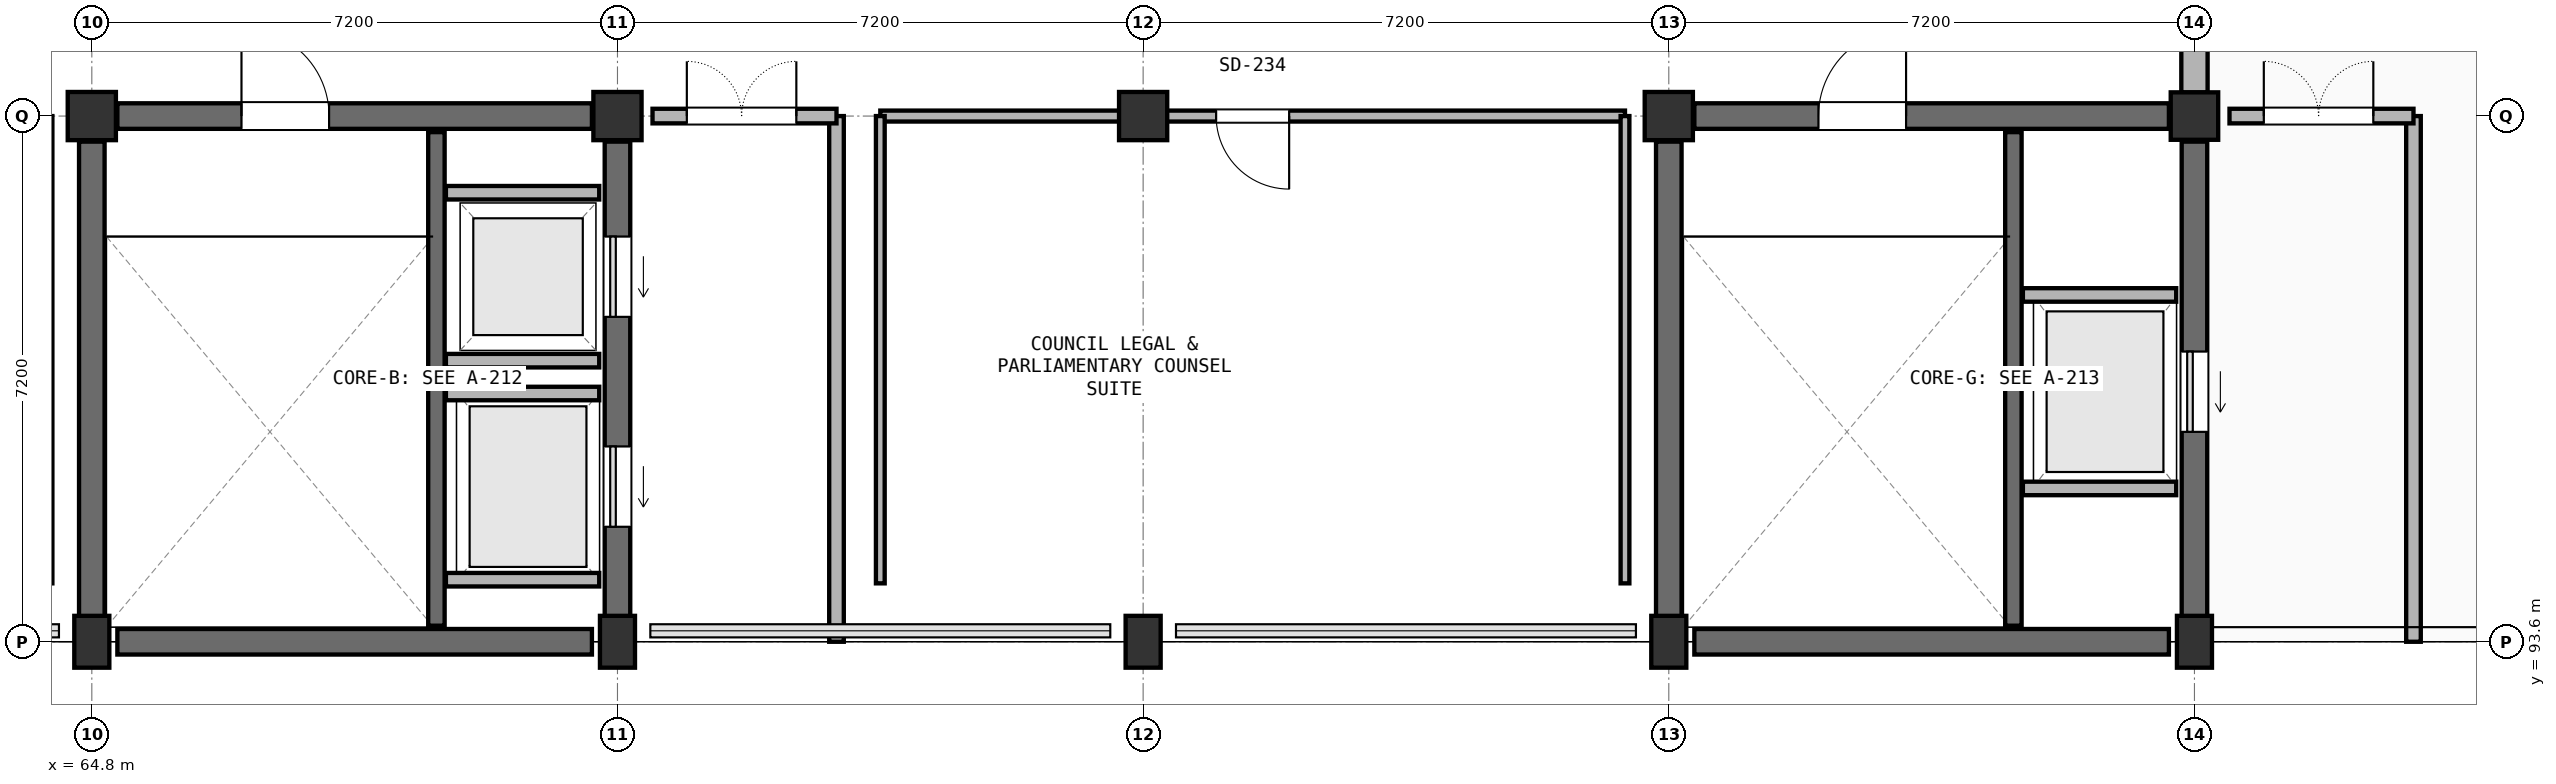
"""IFC4 building model, lengths in metres.
Left out: names, types, materials, properties, quantities, classifications, styles, units other than length and angle.
Written with IfcOpenShell. Run it as: python <this file> out.ifc"""

import sys

from ifc_helpers import new_model, si_unit, direction, frame, frame_2d, origin, origin_2d, place, context, subcontext, project, spatial, rectangle, extrude, element, fill, save


model = new_model("IFC4")
c1 = context("Model", 3, precision=1e-05, world=origin(), true_north=direction((0.0, 1.0)))
c2 = subcontext(c1, "Body", "Model", "MODEL_VIEW")
j1 = project(units=[si_unit("LENGTHUNIT", "METRE"), si_unit("PLANEANGLEUNIT", "RADIAN")], contexts=[c1])
p1 = place(None, origin())
s1 = spatial("IfcSite", under=j1, at=p1, CompositionType="ELEMENT")
p2 = place(p1, origin())
s2 = spatial("IfcBuilding", under=s1, at=p2, CompositionType="ELEMENT")
p3 = place(p2, frame((0.0, 0.0, 30.3)))
s3 = spatial("IfcBuildingStorey", under=s2, at=p3, CompositionType="ELEMENT", Elevation=30.3)
p4 = place(p3, frame((64.8, 93.6, 0.0), z_axis=(0.0, 0.0, 1.0), x_axis=(1.0, 0.0, 0.0)))
e1 = element("IfcColumn", 1, at=p4, inside=s3, PredefinedType="COLUMN", context=c2, shape_type="SweptSolid", body=[
    extrude(rectangle(XDim=0.48, YDim=0.71, at=origin_2d()), origin(), (0.0, 0.0, 1.0), 3.9),
])
p5 = place(p3, frame((64.8, 100.8, 0.0), z_axis=(0.0, 0.0, 1.0), x_axis=(1.0, 0.0, 0.0)))
e2 = element("IfcColumn", 2, at=p5, inside=s3, PredefinedType="COLUMN", context=c2, shape_type="SweptSolid", body=[
    extrude(rectangle(XDim=0.66, YDim=0.66, at=origin_2d()), origin(), (0.0, 0.0, 1.0), 3.9),
])
p6 = place(p3, frame((72.0, 93.6, 0.0), z_axis=(0.0, 0.0, 1.0), x_axis=(1.0, 0.0, 0.0)))
e3 = element("IfcColumn", 3, at=p6, inside=s3, PredefinedType="COLUMN", context=c2, shape_type="SweptSolid", body=[
    extrude(rectangle(XDim=0.48, YDim=0.71, at=origin_2d()), origin(), (0.0, 0.0, 1.0), 3.9),
])
p7 = place(p3, frame((72.0, 100.8, 0.0), z_axis=(0.0, 0.0, 1.0), x_axis=(1.0, 0.0, 0.0)))
e4 = element("IfcColumn", 4, at=p7, inside=s3, PredefinedType="COLUMN", context=c2, shape_type="SweptSolid", body=[
    extrude(rectangle(XDim=0.66, YDim=0.66, at=origin_2d()), origin(), (0.0, 0.0, 1.0), 3.9),
])
p8 = place(p3, frame((79.2, 93.6, 0.0), z_axis=(0.0, 0.0, 1.0), x_axis=(1.0, 0.0, 0.0)))
e5 = element("IfcColumn", 5, at=p8, inside=s3, PredefinedType="COLUMN", context=c2, shape_type="SweptSolid", body=[
    extrude(rectangle(XDim=0.48, YDim=0.71, at=origin_2d()), origin(), (0.0, 0.0, 1.0), 3.9),
])
p9 = place(p3, frame((79.2, 100.8, 0.0), z_axis=(0.0, 0.0, 1.0), x_axis=(1.0, 0.0, 0.0)))
e6 = element("IfcColumn", 6, at=p9, inside=s3, PredefinedType="COLUMN", context=c2, shape_type="SweptSolid", body=[
    extrude(rectangle(XDim=0.66, YDim=0.66, at=origin_2d()), origin(), (0.0, 0.0, 1.0), 3.9),
])
p10 = place(p3, frame((86.4, 93.6, 0.0), z_axis=(0.0, 0.0, 1.0), x_axis=(1.0, 0.0, 0.0)))
e7 = element("IfcColumn", 7, at=p10, inside=s3, PredefinedType="COLUMN", context=c2, shape_type="SweptSolid", body=[
    extrude(rectangle(XDim=0.48, YDim=0.71, at=origin_2d()), origin(), (0.0, 0.0, 1.0), 3.9),
])
p11 = place(p3, frame((86.4, 100.8, 0.0), z_axis=(0.0, 0.0, 1.0), x_axis=(1.0, 0.0, 0.0)))
e8 = element("IfcColumn", 8, at=p11, inside=s3, PredefinedType="COLUMN", context=c2, shape_type="SweptSolid", body=[
    extrude(rectangle(XDim=0.66, YDim=0.66, at=origin_2d()), origin(), (0.0, 0.0, 1.0), 3.9),
])
p12 = place(p3, frame((93.6, 93.6, 0.0), z_axis=(0.0, 0.0, 1.0), x_axis=(1.0, 0.0, 0.0)))
e9 = element("IfcColumn", 9, at=p12, inside=s3, PredefinedType="COLUMN", context=c2, shape_type="SweptSolid", body=[
    extrude(rectangle(XDim=0.48, YDim=0.71, at=origin_2d()), origin(), (0.0, 0.0, 1.0), 3.9),
])
p13 = place(p3, frame((93.6, 100.8, 0.0), z_axis=(0.0, 0.0, 1.0), x_axis=(1.0, 0.0, 0.0)))
e10 = element("IfcColumn", 10, at=p13, inside=s3, PredefinedType="COLUMN", context=c2, shape_type="SweptSolid", body=[
    extrude(rectangle(XDim=0.65, YDim=0.65, at=origin_2d()), origin(), (0.0, 0.0, 1.0), 3.9),
])
p14 = place(p3, frame((65.15, 93.6, 0.0), z_axis=(0.0, 0.0, 1.0), x_axis=(1.0, 0.0, 0.0)))
e11 = element("IfcWall", 11, at=p14, inside=s3, PredefinedType="SHEAR", context=c2, shape_type="SweptSolid", body=[
    extrude(rectangle(XDim=6.5, YDim=0.35, at=frame_2d((3.25, 0.0))), origin(), (0.0, 0.0, 1.0), 3.9),
])
p15 = place(p3, frame((72.0, 93.95, 0.0), z_axis=(0.0, 0.0, 1.0), x_axis=(0.0, 1.0, 0.0)))
e12 = element("IfcWall", 12, at=p15, inside=s3, PredefinedType="SHEAR", context=c2, shape_type="SweptSolid", body=[
    extrude(rectangle(XDim=6.5, YDim=0.35, at=frame_2d((3.25, 0.0))), origin(), (0.0, 0.0, 1.0), 3.9),
])
p16 = place(p15, frame((1.225, 0.0, 0.0)))
e13 = element("IfcOpeningElement", 13, at=p16, cuts=e12, PredefinedType="OPENING", context=c2, shape_type="SweptSolid", body=[
    extrude(rectangle(XDim=1.1, YDim=2.2, at=frame_2d((0.55, 1.1))), frame((0.0, 0.185, 0.0), z_axis=(0.0, -1.0, 0.0), x_axis=(1.0, 0.0, 0.0)), (0.0, 0.0, 1.0), 0.37),
])
p17 = place(p15, frame((4.1, 0.0, 0.0)))
e14 = element("IfcOpeningElement", 14, at=p17, cuts=e12, PredefinedType="OPENING", context=c2, shape_type="SweptSolid", body=[
    extrude(rectangle(XDim=1.1, YDim=2.2, at=frame_2d((0.55, 1.1))), frame((0.0, 0.185, 0.0), z_axis=(0.0, -1.0, 0.0), x_axis=(1.0, 0.0, 0.0)), (0.0, 0.0, 1.0), 0.37),
])
p18 = place(p3, frame((71.65, 100.8, 0.0), z_axis=(0.0, 0.0, 1.0), x_axis=(-1.0, 0.0, 0.0)))
e15 = element("IfcWall", 15, at=p18, inside=s3, PredefinedType="SHEAR", context=c2, shape_type="SweptSolid", body=[
    extrude(rectangle(XDim=6.5, YDim=0.35, at=frame_2d((3.25, 0.0))), origin(), (0.0, 0.0, 1.0), 3.9),
])
p19 = place(p18, frame((3.6, 0.0, 0.0)))
e16 = element("IfcOpeningElement", 16, at=p19, cuts=e15, PredefinedType="OPENING", context=c2, shape_type="SweptSolid", body=[
    extrude(rectangle(XDim=1.2, YDim=2.2, at=frame_2d((0.6, 1.1))), frame((0.0, 0.185, 0.0), z_axis=(0.0, -1.0, 0.0), x_axis=(1.0, 0.0, 0.0)), (0.0, 0.0, 1.0), 0.37),
])
p20 = place(p3, frame((64.8, 100.45, 0.0), z_axis=(0.0, 0.0, 1.0), x_axis=(0.0, -1.0, 0.0)))
e17 = element("IfcWall", 17, at=p20, inside=s3, PredefinedType="SHEAR", context=c2, shape_type="SweptSolid", body=[
    extrude(rectangle(XDim=6.5, YDim=0.35, at=frame_2d((3.25, 0.0))), origin(), (0.0, 0.0, 1.0), 3.9),
])
p21 = place(p3, frame((69.52, 93.82, 0.0), z_axis=(0.0, 0.0, 1.0), x_axis=(0.0, 1.0, 0.0)))
e18 = element("IfcWall", 18, at=p21, inside=s3, PredefinedType="SHEAR", context=c2, shape_type="SweptSolid", body=[
    extrude(rectangle(XDim=6.76, YDim=0.225, at=frame_2d((3.38, 0.0))), origin(), (0.0, 0.0, 1.0), 3.9),
])
p22 = place(p3, frame((86.75, 93.6, 0.0), z_axis=(0.0, 0.0, 1.0), x_axis=(1.0, 0.0, 0.0)))
e19 = element("IfcWall", 19, at=p22, inside=s3, PredefinedType="SHEAR", context=c2, shape_type="SweptSolid", body=[
    extrude(rectangle(XDim=6.5, YDim=0.35, at=frame_2d((3.25, 0.0))), origin(), (0.0, 0.0, 1.0), 3.9),
])
p23 = place(p3, frame((93.6, 93.95, 0.0), z_axis=(0.0, 0.0, 1.0), x_axis=(0.0, 1.0, 0.0)))
e20 = element("IfcWall", 20, at=p23, inside=s3, PredefinedType="SHEAR", context=c2, shape_type="SweptSolid", body=[
    extrude(rectangle(XDim=6.5, YDim=0.35, at=frame_2d((3.25, 0.0))), origin(), (0.0, 0.0, 1.0), 3.9),
])
p24 = place(p23, frame((2.525, 0.0, 0.0)))
e21 = element("IfcOpeningElement", 21, at=p24, cuts=e20, PredefinedType="OPENING", context=c2, shape_type="SweptSolid", body=[
    extrude(rectangle(XDim=1.1, YDim=2.2, at=frame_2d((0.55, 1.1))), frame((0.0, 0.185, 0.0), z_axis=(0.0, -1.0, 0.0), x_axis=(1.0, 0.0, 0.0)), (0.0, 0.0, 1.0), 0.37),
])
p25 = place(p3, frame((93.25, 100.8, 0.0), z_axis=(0.0, 0.0, 1.0), x_axis=(-1.0, 0.0, 0.0)))
e22 = element("IfcWall", 22, at=p25, inside=s3, PredefinedType="SHEAR", context=c2, shape_type="SweptSolid", body=[
    extrude(rectangle(XDim=6.5, YDim=0.35, at=frame_2d((3.25, 0.0))), origin(), (0.0, 0.0, 1.0), 3.9),
])
p26 = place(p25, frame((3.6, 0.0, 0.0)))
e23 = element("IfcOpeningElement", 23, at=p26, cuts=e22, PredefinedType="OPENING", context=c2, shape_type="SweptSolid", body=[
    extrude(rectangle(XDim=1.2, YDim=2.2, at=frame_2d((0.6, 1.1))), frame((0.0, 0.185, 0.0), z_axis=(0.0, -1.0, 0.0), x_axis=(1.0, 0.0, 0.0)), (0.0, 0.0, 1.0), 0.37),
])
p27 = place(p3, frame((86.4, 100.45, 0.0), z_axis=(0.0, 0.0, 1.0), x_axis=(0.0, -1.0, 0.0)))
e24 = element("IfcWall", 24, at=p27, inside=s3, PredefinedType="SHEAR", context=c2, shape_type="SweptSolid", body=[
    extrude(rectangle(XDim=6.5, YDim=0.35, at=frame_2d((3.25, 0.0))), origin(), (0.0, 0.0, 1.0), 3.9),
])
p28 = place(p3, frame((91.12, 93.82, 0.0), z_axis=(0.0, 0.0, 1.0), x_axis=(0.0, 1.0, 0.0)))
e25 = element("IfcWall", 25, at=p28, inside=s3, PredefinedType="SHEAR", context=c2, shape_type="SweptSolid", body=[
    extrude(rectangle(XDim=6.76, YDim=0.225, at=frame_2d((3.38, 0.0))), origin(), (0.0, 0.0, 1.0), 3.9),
])
for number, where, z_axis, x_axis in (
    (26, (69.65, 94.45, 0.0), (0.0, 0.0, 1.0), (1.0, 0.0, 0.0)),
    (27, (69.65, 97.0, 0.0), (0.0, 0.0, 1.0), (1.0, 0.0, 0.0)),
    (28, (69.65, 97.45, 0.0), (0.0, 0.0, 1.0), (1.0, 0.0, 0.0)),
    (29, (69.65, 99.75, 0.0), (0.0, 0.0, 1.0), (1.0, 0.0, 0.0)),
    (30, (91.25, 95.7, 0.0), (0.0, 0.0, 1.0), (1.0, 0.0, 0.0)),
    (31, (91.25, 98.35, 0.0), (0.0, 0.0, 1.0), (1.0, 0.0, 0.0)),
):
    element("IfcWall", number, at=place(p3, frame(where, z_axis=z_axis, x_axis=x_axis)), inside=s3, PredefinedType="PARTITIONING", context=c2, shape_type="SweptSolid", body=[
        extrude(rectangle(XDim=2.1, YDim=0.185, at=frame_2d((1.05, 0.0))), origin(), (0.0, 0.0, 1.0), 3.9),
    ])
p29 = place(p3, frame((93.6, 107.677, 0.0), z_axis=(0.0, 0.0, 1.0), x_axis=(0.0, -1.0, 0.0)))
e32 = element("IfcWall", 32, at=p29, inside=s3, PredefinedType="SOLIDWALL", context=c2, shape_type="SweptSolid", body=[
    extrude(rectangle(XDim=6.554, YDim=0.36, at=frame_2d((3.277, 0.0))), origin(), (0.0, 0.0, 1.0), 2.74),
])
p30 = place(p3, frame((75.0, 93.6, 0.0), z_axis=(0.0, 0.0, 1.0), x_axis=(0.0, 1.0, 0.0)))
e33 = element("IfcWall", 33, at=p30, inside=s3, PredefinedType="PARTITIONING", context=c2, shape_type="SweptSolid", body=[
    extrude(rectangle(XDim=7.2, YDim=0.2, at=frame_2d((3.6, 0.0))), origin(), (0.0, 0.0, 1.0), 2.78),
])
p31 = place(p3, frame((75.0, 100.8, 0.0), z_axis=(0.0, 0.0, 1.0), x_axis=(-1.0, 0.0, 0.0)))
e34 = element("IfcWall", 34, at=p31, inside=s3, PredefinedType="PARTITIONING", context=c2, shape_type="SweptSolid", body=[
    extrude(rectangle(XDim=2.52, YDim=0.2, at=frame_2d((1.26, 0.0))), origin(), (0.0, 0.0, 1.0), 2.78),
])
p32 = place(p31, frame((0.55, 0.0, 0.0)))
e35 = element("IfcOpeningElement", 35, at=p32, cuts=e34, PredefinedType="OPENING", context=c2, shape_type="SweptSolid", body=[
    extrude(rectangle(XDim=1.5, YDim=2.2, at=frame_2d((0.75, 1.1))), frame((0.0, 0.11, 0.0), z_axis=(0.0, -1.0, 0.0), x_axis=(1.0, 0.0, 0.0)), (0.0, 0.0, 1.0), 0.22),
])
p33 = place(p3, frame((96.6, 93.6, 0.0), z_axis=(0.0, 0.0, 1.0), x_axis=(0.0, 1.0, 0.0)))
e36 = element("IfcWall", 36, at=p33, inside=s3, PredefinedType="PARTITIONING", context=c2, shape_type="SweptSolid", body=[
    extrude(rectangle(XDim=7.2, YDim=0.2, at=frame_2d((3.6, 0.0))), origin(), (0.0, 0.0, 1.0), 2.78),
])
p34 = place(p3, frame((96.6, 100.8, 0.0), z_axis=(0.0, 0.0, 1.0), x_axis=(-1.0, 0.0, 0.0)))
e37 = element("IfcWall", 37, at=p34, inside=s3, PredefinedType="PARTITIONING", context=c2, shape_type="SweptSolid", body=[
    extrude(rectangle(XDim=2.52, YDim=0.2, at=frame_2d((1.26, 0.0))), origin(), (0.0, 0.0, 1.0), 2.78),
])
p35 = place(p34, frame((0.55, 0.0, 0.0)))
e38 = element("IfcOpeningElement", 38, at=p35, cuts=e37, PredefinedType="OPENING", context=c2, shape_type="SweptSolid", body=[
    extrude(rectangle(XDim=1.5, YDim=2.2, at=frame_2d((0.75, 1.1))), frame((0.0, 0.11, 0.0), z_axis=(0.0, -1.0, 0.0), x_axis=(1.0, 0.0, 0.0)), (0.0, 0.0, 1.0), 0.22),
])
p36 = place(p3, frame((64.2, 100.8, 0.0), z_axis=(0.0, 0.0, 1.0), x_axis=(0.0, -1.0, 0.0)))
e39 = element("IfcWall", 39, at=p36, inside=s3, PredefinedType="PARTITIONING", context=c2, shape_type="SweptSolid", body=[
    extrude(rectangle(XDim=6.4, YDim=0.12, at=frame_2d((3.2, 0.0))), origin(), (0.0, 0.0, 1.0), 2.78),
])
p37 = place(p3, frame((85.8, 100.8, 0.0), z_axis=(0.0, 0.0, 1.0), x_axis=(-1.0, 0.0, 0.0)))
e40 = element("IfcWall", 40, at=p37, inside=s3, PredefinedType="PARTITIONING", context=c2, shape_type="SweptSolid", body=[
    extrude(rectangle(XDim=10.2, YDim=0.15, at=frame_2d((5.1, 0.0))), origin(), (0.0, 0.0, 1.0), 2.78),
])
p38 = place(p37, frame((4.6, 0.0, 0.0)))
e41 = element("IfcOpeningElement", 41, at=p38, cuts=e40, PredefinedType="OPENING", context=c2, shape_type="SweptSolid", body=[
    extrude(rectangle(XDim=1.0, YDim=2.15, at=frame_2d((0.5, 1.075))), frame((0.0, 0.085, 0.0), z_axis=(0.0, -1.0, 0.0), x_axis=(1.0, 0.0, 0.0)), (0.0, 0.0, 1.0), 0.17),
])
for number, where, z_axis, x_axis in (
    (42, (75.6, 94.4, 0.0), (0.0, 0.0, 1.0), (0.0, 1.0, 0.0)),
    (43, (85.8, 100.8, 0.0), (0.0, 0.0, 1.0), (0.0, -1.0, 0.0)),
):
    element("IfcWall", number, at=place(p3, frame(where, z_axis=z_axis, x_axis=x_axis)), inside=s3, PredefinedType="PARTITIONING", context=c2, shape_type="SweptSolid", body=[
        extrude(rectangle(XDim=6.4, YDim=0.12, at=frame_2d((3.2, 0.0))), origin(), (0.0, 0.0, 1.0), 2.78),
    ])
p39 = place(p16, origin())
e44 = element("IfcDoor", 44, at=p39, inside=s3, OperationType="SLIDING_TO_LEFT", PredefinedType="DOOR", context=c2, shape_type="SweptSolid", body=[
    extrude(rectangle(XDim=1.1, YDim=2.2, at=frame_2d((0.55, 1.1))), frame((0.0, 0.025, 0.0), z_axis=(0.0, -1.0, 0.0), x_axis=(1.0, 0.0, 0.0)), (0.0, 0.0, 1.0), 0.05),
])
fill(e13, e44)
p40 = place(p17, origin())
e45 = element("IfcDoor", 45, at=p40, inside=s3, OperationType="SLIDING_TO_LEFT", PredefinedType="DOOR", context=c2, shape_type="SweptSolid", body=[
    extrude(rectangle(XDim=1.1, YDim=2.2, at=frame_2d((0.55, 1.1))), frame((0.0, 0.025, 0.0), z_axis=(0.0, -1.0, 0.0), x_axis=(1.0, 0.0, 0.0)), (0.0, 0.0, 1.0), 0.05),
])
fill(e14, e45)
p41 = place(p24, origin())
e46 = element("IfcDoor", 46, at=p41, inside=s3, OperationType="SLIDING_TO_LEFT", PredefinedType="DOOR", context=c2, shape_type="SweptSolid", body=[
    extrude(rectangle(XDim=1.1, YDim=2.2, at=frame_2d((0.55, 1.1))), frame((0.0, 0.025, 0.0), z_axis=(0.0, -1.0, 0.0), x_axis=(1.0, 0.0, 0.0)), (0.0, 0.0, 1.0), 0.05),
])
fill(e21, e46)
p42 = place(p19, frame((1.2, 0.0, 0.0), z_axis=(0.0, 0.0, 1.0), x_axis=(-1.0, 0.0, 0.0)))
e47 = element("IfcDoor", 47, at=p42, inside=s3, OperationType="SINGLE_SWING_LEFT", PredefinedType="DOOR", context=c2, shape_type="SweptSolid", body=[
    extrude(rectangle(XDim=1.2, YDim=2.2, at=frame_2d((0.6, 1.1))), frame((0.0, 0.025, 0.0), z_axis=(0.0, -1.0, 0.0), x_axis=(1.0, 0.0, 0.0)), (0.0, 0.0, 1.0), 0.05),
])
fill(e16, e47)
p43 = place(p32, frame((1.5, 0.0, 0.0), z_axis=(0.0, 0.0, 1.0), x_axis=(-1.0, 0.0, 0.0)))
e48 = element("IfcDoor", 48, at=p43, inside=s3, OperationType="DOUBLE_DOOR_SINGLE_SWING", PredefinedType="DOOR", context=c2, shape_type="SweptSolid", body=[
    extrude(rectangle(XDim=1.5, YDim=2.2, at=frame_2d((0.75, 1.1))), frame((0.0, 0.025, 0.0), z_axis=(0.0, -1.0, 0.0), x_axis=(1.0, 0.0, 0.0)), (0.0, 0.0, 1.0), 0.05),
])
fill(e35, e48)
p44 = place(p26, frame((1.2, 0.0, 0.0), z_axis=(0.0, 0.0, 1.0), x_axis=(-1.0, 0.0, 0.0)))
e49 = element("IfcDoor", 49, at=p44, inside=s3, OperationType="SINGLE_SWING_RIGHT", PredefinedType="DOOR", context=c2, shape_type="SweptSolid", body=[
    extrude(rectangle(XDim=1.2, YDim=2.2, at=frame_2d((0.6, 1.1))), frame((0.0, 0.025, 0.0), z_axis=(0.0, -1.0, 0.0), x_axis=(1.0, 0.0, 0.0)), (0.0, 0.0, 1.0), 0.05),
])
fill(e23, e49)
p45 = place(p35, frame((1.5, 0.0, 0.0), z_axis=(0.0, 0.0, 1.0), x_axis=(-1.0, 0.0, 0.0)))
e50 = element("IfcDoor", 50, at=p45, inside=s3, OperationType="DOUBLE_DOOR_SINGLE_SWING", PredefinedType="DOOR", context=c2, shape_type="SweptSolid", body=[
    extrude(rectangle(XDim=1.5, YDim=2.2, at=frame_2d((0.75, 1.1))), frame((0.0, 0.025, 0.0), z_axis=(0.0, -1.0, 0.0), x_axis=(1.0, 0.0, 0.0)), (0.0, 0.0, 1.0), 0.05),
])
fill(e38, e50)
p46 = place(p38, origin())
e51 = element("IfcDoor", 51, at=p46, inside=s3, OperationType="SINGLE_SWING_LEFT", PredefinedType="DOOR", context=c2, shape_type="SweptSolid", body=[
    extrude(rectangle(XDim=1.0, YDim=2.15, at=frame_2d((0.5, 1.075))), frame((0.0, 0.025, 0.0), z_axis=(0.0, -1.0, 0.0), x_axis=(1.0, 0.0, 0.0)), (0.0, 0.0, 1.0), 0.05),
])
fill(e41, e51)
save(model, sys.argv[1])
